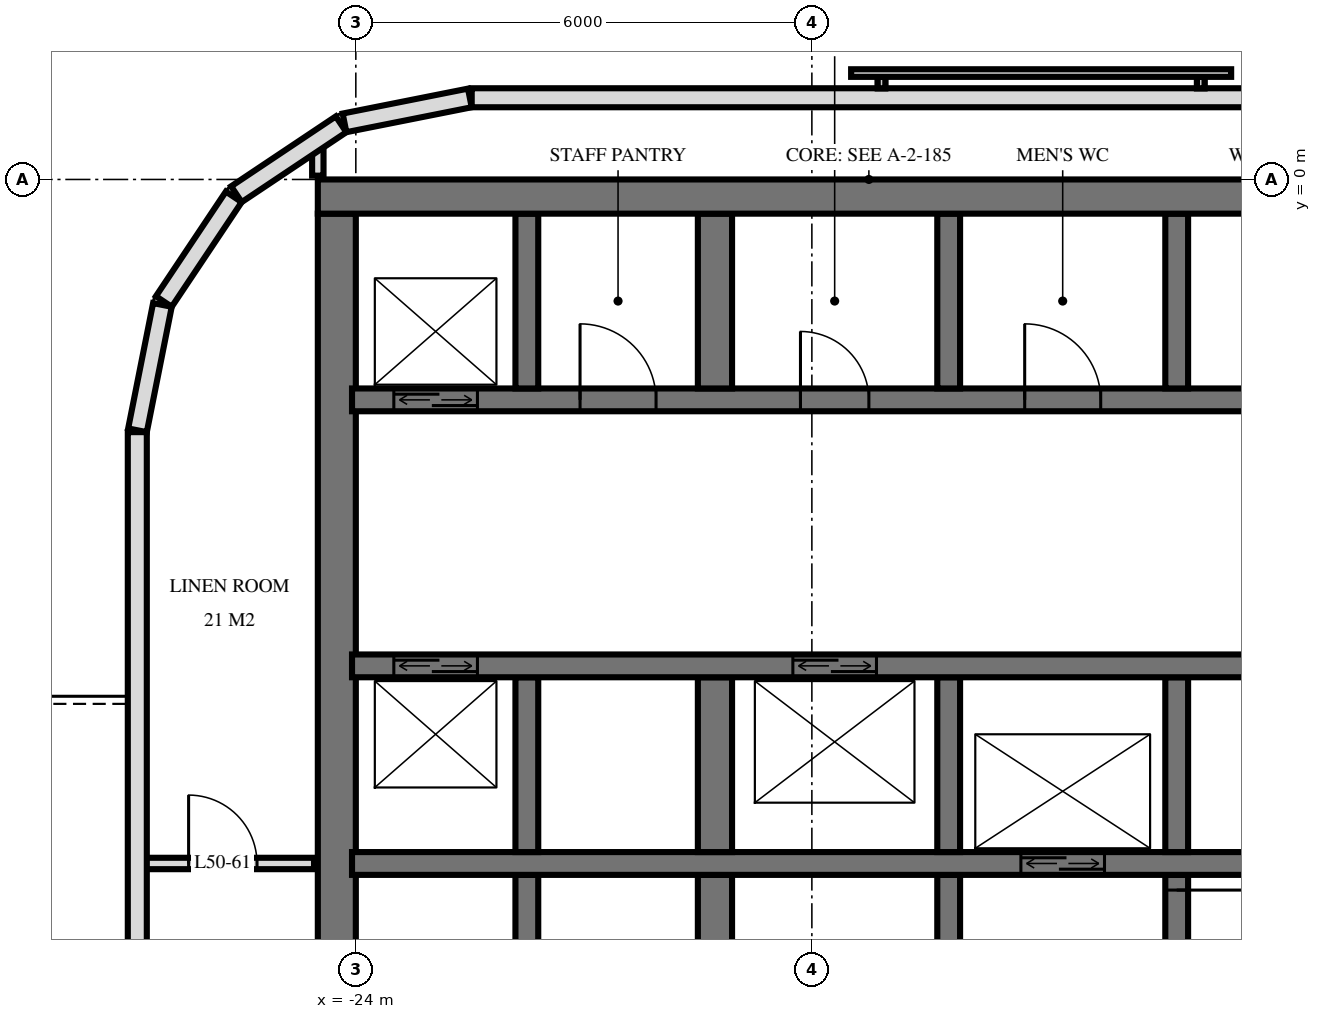
"""IFC4 building model, lengths in metres.
Left out: names, types, materials, properties, quantities, classifications, styles, units other than length and angle.
Written with IfcOpenShell. Run it as: python <this file> out.ifc"""

import sys

from ifc_helpers import new_model, si_unit, direction, frame, frame_2d, origin, place, context, subcontext, project, spatial, rectangle, extrude, element, fill, save


model = new_model("IFC4")
c1 = context("Model", 3, precision=1e-05, world=origin(), true_north=direction((0.0, 1.0)))
c2 = subcontext(c1, "Body", "Model", "MODEL_VIEW")
j1 = project(units=[si_unit("LENGTHUNIT", "METRE"), si_unit("PLANEANGLEUNIT", "RADIAN")], contexts=[c1])
p1 = place(None, origin())
s1 = spatial("IfcSite", under=j1, at=p1, CompositionType="ELEMENT")
p2 = place(p1, origin())
s2 = spatial("IfcBuilding", under=s1, at=p2, CompositionType="ELEMENT")
p3 = place(p2, frame((0.0, 0.0, 194.1)))
s3 = spatial("IfcBuildingStorey", under=s2, at=p3, CompositionType="ELEMENT", Elevation=194.1)
p4 = place(p3, frame((-24.5, -0.225, 0.0), z_axis=(0.0, 0.0, 1.0), x_axis=(1.0, 0.0, 0.0)))
e1 = element("IfcWall", 1, at=p4, inside=s3, PredefinedType="SHEAR", context=c2, shape_type="SweptSolid", body=[
    extrude(rectangle(XDim=14.5, YDim=0.45, at=frame_2d((7.25, 0.0))), origin(), (0.0, 0.0, 1.0), 3.5),
])
p5 = place(p3, frame((-24.25, -14.55, 0.0), z_axis=(0.0, 0.0, 1.0), x_axis=(0.0, 1.0, 0.0)))
e2 = element("IfcWall", 2, at=p5, inside=s3, PredefinedType="SHEAR", context=c2, shape_type="SweptSolid", body=[
    extrude(rectangle(XDim=14.1, YDim=0.5, at=frame_2d((7.05, 0.0))), origin(), (0.0, 0.0, 1.0), 3.5),
])
p6 = place(p3, frame((-24.05, -2.9, 0.0), z_axis=(0.0, 0.0, 1.0), x_axis=(1.0, 0.0, 0.0)))
e3 = element("IfcWall", 3, at=p6, inside=s3, PredefinedType="SHEAR", context=c2, shape_type="SweptSolid", body=[
    extrude(rectangle(XDim=13.7, YDim=0.3, at=frame_2d((6.85, 0.0))), origin(), (0.0, 0.0, 1.0), 3.5),
])
p7 = place(p6, frame((0.55, 0.0, 0.0)))
e4 = element("IfcOpeningElement", 4, at=p7, cuts=e3, PredefinedType="OPENING", context=c2, shape_type="SweptSolid", body=[
    extrude(rectangle(XDim=1.1, YDim=2.1, at=frame_2d((0.55, 1.05))), frame((0.0, 0.16, 0.0), z_axis=(0.0, -1.0, 0.0), x_axis=(1.0, 0.0, 0.0)), (0.0, 0.0, 1.0), 0.32),
])
p8 = place(p6, frame((5.9, 0.0, 0.0)))
e5 = element("IfcOpeningElement", 5, at=p8, cuts=e3, PredefinedType="OPENING", context=c2, shape_type="SweptSolid", body=[
    extrude(rectangle(XDim=0.9, YDim=2.1, at=frame_2d((0.45, 1.05))), frame((0.0, 0.16, 0.0), z_axis=(0.0, -1.0, 0.0), x_axis=(1.0, 0.0, 0.0)), (0.0, 0.0, 1.0), 0.32),
])
p9 = place(p6, frame((11.85, 0.0, 0.0)))
e6 = element("IfcOpeningElement", 6, at=p9, cuts=e3, PredefinedType="OPENING", context=c2, shape_type="SweptSolid", body=[
    extrude(rectangle(XDim=1.0, YDim=2.1, at=frame_2d((0.5, 1.05))), frame((0.0, 0.16, 0.0), z_axis=(0.0, -1.0, 0.0), x_axis=(1.0, 0.0, 0.0)), (0.0, 0.0, 1.0), 0.32),
])
p10 = place(p6, frame((8.85, 0.0, 0.0)))
e7 = element("IfcOpeningElement", 7, at=p10, cuts=e3, PredefinedType="OPENING", context=c2, shape_type="SweptSolid", body=[
    extrude(rectangle(XDim=1.0, YDim=2.1, at=frame_2d((0.5, 1.05))), frame((0.0, 0.16, 0.0), z_axis=(0.0, -1.0, 0.0), x_axis=(1.0, 0.0, 0.0)), (0.0, 0.0, 1.0), 0.32),
])
p11 = place(p6, frame((3.0, 0.0, 0.0)))
e8 = element("IfcOpeningElement", 8, at=p11, cuts=e3, PredefinedType="OPENING", context=c2, shape_type="SweptSolid", body=[
    extrude(rectangle(XDim=1.0, YDim=2.1, at=frame_2d((0.5, 1.05))), frame((0.0, 0.16, 0.0), z_axis=(0.0, -1.0, 0.0), x_axis=(1.0, 0.0, 0.0)), (0.0, 0.0, 1.0), 0.32),
])
p12 = place(p3, frame((-24.05, -6.4, 0.0), z_axis=(0.0, 0.0, 1.0), x_axis=(1.0, 0.0, 0.0)))
e9 = element("IfcWall", 9, at=p12, inside=s3, PredefinedType="SHEAR", context=c2, shape_type="SweptSolid", body=[
    extrude(rectangle(XDim=13.7, YDim=0.3, at=frame_2d((6.85, 0.0))), origin(), (0.0, 0.0, 1.0), 3.5),
])
p13 = place(p12, frame((0.55, 0.0, 0.0)))
e10 = element("IfcOpeningElement", 10, at=p13, cuts=e9, PredefinedType="OPENING", context=c2, shape_type="SweptSolid", body=[
    extrude(rectangle(XDim=1.1, YDim=2.1, at=frame_2d((0.55, 1.05))), frame((0.0, 0.16, 0.0), z_axis=(0.0, -1.0, 0.0), x_axis=(1.0, 0.0, 0.0)), (0.0, 0.0, 1.0), 0.32),
])
p14 = place(p12, frame((5.8, 0.0, 0.0)))
e11 = element("IfcOpeningElement", 11, at=p14, cuts=e9, PredefinedType="OPENING", context=c2, shape_type="SweptSolid", body=[
    extrude(rectangle(XDim=1.1, YDim=2.1, at=frame_2d((0.55, 1.05))), frame((0.0, 0.16, 0.0), z_axis=(0.0, -1.0, 0.0), x_axis=(1.0, 0.0, 0.0)), (0.0, 0.0, 1.0), 0.32),
])
p15 = place(p3, frame((-24.05, -9.0, 0.0), z_axis=(0.0, 0.0, 1.0), x_axis=(1.0, 0.0, 0.0)))
e12 = element("IfcWall", 12, at=p15, inside=s3, PredefinedType="SHEAR", context=c2, shape_type="SweptSolid", body=[
    extrude(rectangle(XDim=13.7, YDim=0.3, at=frame_2d((6.85, 0.0))), origin(), (0.0, 0.0, 1.0), 3.5),
])
p16 = place(p15, frame((8.8, 0.0, 0.0)))
e13 = element("IfcOpeningElement", 13, at=p16, cuts=e12, PredefinedType="OPENING", context=c2, shape_type="SweptSolid", body=[
    extrude(rectangle(XDim=1.1, YDim=2.1, at=frame_2d((0.55, 1.05))), frame((0.0, 0.16, 0.0), z_axis=(0.0, -1.0, 0.0), x_axis=(1.0, 0.0, 0.0)), (0.0, 0.0, 1.0), 0.32),
])
for number, where, z_axis, x_axis in (
    (14, (-13.2, -2.75, 0.0), (0.0, 0.0, 1.0), (0.0, 1.0, 0.0)),
    (15, (-13.2, -8.85, 0.0), (0.0, 0.0, 1.0), (0.0, 1.0, 0.0)),
):
    element("IfcWall", number, at=place(p3, frame(where, z_axis=z_axis, x_axis=x_axis)), inside=s3, PredefinedType="SHEAR", context=c2, shape_type="SweptSolid", body=[
        extrude(rectangle(XDim=2.3, YDim=0.3, at=frame_2d((1.15, 0.0))), origin(), (0.0, 0.0, 1.0), 3.5),
    ])
p17 = place(p3, frame((-13.2, -14.55, 0.0), z_axis=(0.0, 0.0, 1.0), x_axis=(0.0, 1.0, 0.0)))
e16 = element("IfcWall", 16, at=p17, inside=s3, PredefinedType="SHEAR", context=c2, shape_type="SweptSolid", body=[
    extrude(rectangle(XDim=5.4, YDim=0.3, at=frame_2d((2.7, 0.0))), origin(), (0.0, 0.0, 1.0), 3.5),
])
p18 = place(p17, frame((4.0, 0.0, 0.0)))
e17 = element("IfcOpeningElement", 17, at=p18, cuts=e16, PredefinedType="OPENING", context=c2, shape_type="SweptSolid", body=[
    extrude(rectangle(XDim=1.2, YDim=2.1, at=frame_2d((0.6, 1.05))), frame((0.0, 0.16, 0.0), z_axis=(0.0, -1.0, 0.0), x_axis=(1.0, 0.0, 0.0)), (0.0, 0.0, 1.0), 0.32),
])
for number, where, z_axis, x_axis in (
    (18, (-16.2, -2.75, 0.0), (0.0, 0.0, 1.0), (0.0, 1.0, 0.0)),
    (19, (-16.2, -8.85, 0.0), (0.0, 0.0, 1.0), (0.0, 1.0, 0.0)),
):
    element("IfcWall", number, at=place(p3, frame(where, z_axis=z_axis, x_axis=x_axis)), inside=s3, PredefinedType="SHEAR", context=c2, shape_type="SweptSolid", body=[
        extrude(rectangle(XDim=2.3, YDim=0.3, at=frame_2d((1.15, 0.0))), origin(), (0.0, 0.0, 1.0), 3.5),
    ])
p19 = place(p3, frame((-16.2, -14.55, 0.0), z_axis=(0.0, 0.0, 1.0), x_axis=(0.0, 1.0, 0.0)))
e20 = element("IfcWall", 20, at=p19, inside=s3, PredefinedType="SHEAR", context=c2, shape_type="SweptSolid", body=[
    extrude(rectangle(XDim=5.4, YDim=0.3, at=frame_2d((2.7, 0.0))), origin(), (0.0, 0.0, 1.0), 3.5),
])
p20 = place(p19, frame((0.2, 0.0, 0.0)))
e21 = element("IfcOpeningElement", 21, at=p20, cuts=e20, PredefinedType="OPENING", context=c2, shape_type="SweptSolid", body=[
    extrude(rectangle(XDim=1.2, YDim=2.1, at=frame_2d((0.6, 1.05))), frame((0.0, 0.16, 0.0), z_axis=(0.0, -1.0, 0.0), x_axis=(1.0, 0.0, 0.0)), (0.0, 0.0, 1.0), 0.32),
])
for number, where, z_axis, x_axis in (
    (22, (-19.275, -2.75, 0.0), (0.0, 0.0, 1.0), (0.0, 1.0, 0.0)),
    (23, (-19.275, -8.85, 0.0), (0.0, 0.0, 1.0), (0.0, 1.0, 0.0)),
):
    element("IfcWall", number, at=place(p3, frame(where, z_axis=z_axis, x_axis=x_axis)), inside=s3, PredefinedType="SHEAR", context=c2, shape_type="SweptSolid", body=[
        extrude(rectangle(XDim=2.3, YDim=0.45, at=frame_2d((1.15, 0.0))), origin(), (0.0, 0.0, 1.0), 3.5),
    ])
p21 = place(p3, frame((-19.275, -14.55, 0.0), z_axis=(0.0, 0.0, 1.0), x_axis=(0.0, 1.0, 0.0)))
e24 = element("IfcWall", 24, at=p21, inside=s3, PredefinedType="SHEAR", context=c2, shape_type="SweptSolid", body=[
    extrude(rectangle(XDim=5.4, YDim=0.45, at=frame_2d((2.7, 0.0))), origin(), (0.0, 0.0, 1.0), 3.5),
])
for number, where, z_axis, x_axis in (
    (25, (-21.75, -2.75, 0.0), (0.0, 0.0, 1.0), (0.0, 1.0, 0.0)),
    (26, (-21.75, -8.85, 0.0), (0.0, 0.0, 1.0), (0.0, 1.0, 0.0)),
):
    element("IfcWall", number, at=place(p3, frame(where, z_axis=z_axis, x_axis=x_axis)), inside=s3, PredefinedType="SHEAR", context=c2, shape_type="SweptSolid", body=[
        extrude(rectangle(XDim=2.3, YDim=0.3, at=frame_2d((1.15, 0.0))), origin(), (0.0, 0.0, 1.0), 3.5),
    ])
p22 = place(p3, frame((-21.75, -14.55, 0.0), z_axis=(0.0, 0.0, 1.0), x_axis=(0.0, 1.0, 0.0)))
e27 = element("IfcWall", 27, at=p22, inside=s3, PredefinedType="SHEAR", context=c2, shape_type="SweptSolid", body=[
    extrude(rectangle(XDim=5.4, YDim=0.3, at=frame_2d((2.7, 0.0))), origin(), (0.0, 0.0, 1.0), 3.5),
])
p23 = place(p3, frame((22.475, 1.075, 0.0), z_axis=(0.0, 0.0, 1.0), x_axis=(-1.0, 0.0, 0.0)))
e28 = element("IfcWall", 28, at=p23, inside=s3, PredefinedType="SOLIDWALL", context=c2, shape_type="SweptSolid", body=[
    extrude(rectangle(XDim=44.951, YDim=0.25, at=frame_2d((22.475, 0.0))), origin(), (0.0, 0.0, 1.0), 3.22),
])
p24 = place(p23, frame((13.775, 0.0, 0.9)))
e29 = element("IfcOpeningElement", 29, at=p24, cuts=e28, PredefinedType="OPENING", context=c2, shape_type="SweptSolid", body=[
    extrude(rectangle(XDim=2.4, YDim=1.5, at=frame_2d((1.2, 0.75))), frame((0.0, 0.135, 0.0), z_axis=(0.0, -1.0, 0.0), x_axis=(1.0, 0.0, 0.0)), (0.0, 0.0, 1.0), 0.27),
])
p25 = place(p23, frame((18.275, 0.0, 0.9)))
e30 = element("IfcOpeningElement", 30, at=p25, cuts=e28, PredefinedType="OPENING", context=c2, shape_type="SweptSolid", body=[
    extrude(rectangle(XDim=2.4, YDim=1.5, at=frame_2d((1.2, 0.75))), frame((0.0, 0.135, 0.0), z_axis=(0.0, -1.0, 0.0), x_axis=(1.0, 0.0, 0.0)), (0.0, 0.0, 1.0), 0.27),
])
p26 = place(p23, frame((29.025, 0.0, 0.9)))
e31 = element("IfcOpeningElement", 31, at=p26, cuts=e28, PredefinedType="OPENING", context=c2, shape_type="SweptSolid", body=[
    extrude(rectangle(XDim=2.4, YDim=1.5, at=frame_2d((1.2, 0.75))), frame((0.0, 0.135, 0.0), z_axis=(0.0, -1.0, 0.0), x_axis=(1.0, 0.0, 0.0)), (0.0, 0.0, 1.0), 0.27),
])
p27 = place(p3, frame((-22.5, 1.073, 0.0), z_axis=(0.0, 0.0, 1.0), x_axis=(-0.980803419081, -0.194999110559, 0.0)))
e32 = element("IfcWall", 32, at=p27, inside=s3, PredefinedType="SOLIDWALL", context=c2, shape_type="SweptSolid", body=[
    extrude(rectangle(XDim=1.681, YDim=0.25, at=frame_2d((0.841, 0.0))), origin(), (0.0, 0.0, 1.0), 3.22),
])
for number, where, z_axis, x_axis in (
    (33, (-24.194, 0.726, 0.0), (0.0, 0.0, 1.0), (-0.831, -0.556, 0.0)),
    (34, (-25.606, -0.229, 0.0), (0.0, 0.0, 1.0), (-0.556, -0.831, 0.0)),
):
    element("IfcWall", number, at=place(p3, frame(where, z_axis=z_axis, x_axis=x_axis)), inside=s3, PredefinedType="SOLIDWALL", context=c2, shape_type="SweptSolid", body=[
        extrude(rectangle(XDim=1.656, YDim=0.25, at=frame_2d((0.828, 0.0))), origin(), (0.0, 0.0, 1.0), 3.22),
    ])
p28 = place(p3, frame((-26.545, -1.651, 0.0), z_axis=(0.0, 0.0, 1.0), x_axis=(-0.194999110559, -0.980803419081, 0.0)))
e35 = element("IfcWall", 35, at=p28, inside=s3, PredefinedType="SOLIDWALL", context=c2, shape_type="SweptSolid", body=[
    extrude(rectangle(XDim=1.681, YDim=0.25, at=frame_2d((0.841, 0.0))), origin(), (0.0, 0.0, 1.0), 3.22),
])
p29 = place(p3, frame((-26.875, -3.325, 0.0), z_axis=(0.0, 0.0, 1.0), x_axis=(0.0, -1.0, 0.0)))
e36 = element("IfcWall", 36, at=p29, inside=s3, PredefinedType="SOLIDWALL", context=c2, shape_type="SweptSolid", body=[
    extrude(rectangle(XDim=21.551, YDim=0.25, at=frame_2d((10.775, 0.0))), origin(), (0.0, 0.0, 1.0), 3.22),
])
p30 = place(p29, frame((7.775, 0.0, 0.0)))
e37 = element("IfcOpeningElement", 37, at=p30, cuts=e36, PredefinedType="OPENING", context=c2, shape_type="SweptSolid", body=[
    extrude(rectangle(XDim=1.8, YDim=2.4, at=frame_2d((0.9, 1.2))), frame((0.0, 0.135, 0.0), z_axis=(0.0, -1.0, 0.0), x_axis=(1.0, 0.0, 0.0)), (0.0, 0.0, 1.0), 0.27),
])
p31 = place(p29, frame((12.575, 0.0, 0.9)))
e38 = element("IfcOpeningElement", 38, at=p31, cuts=e36, PredefinedType="OPENING", context=c2, shape_type="SweptSolid", body=[
    extrude(rectangle(XDim=1.2, YDim=1.5, at=frame_2d((0.6, 0.75))), frame((0.0, 0.135, 0.0), z_axis=(0.0, -1.0, 0.0), x_axis=(1.0, 0.0, 0.0)), (0.0, 0.0, 1.0), 0.27),
])
p32 = place(p29, frame((15.275, 0.0, 0.0)))
e39 = element("IfcOpeningElement", 39, at=p32, cuts=e36, PredefinedType="OPENING", context=c2, shape_type="SweptSolid", body=[
    extrude(rectangle(XDim=1.8, YDim=2.4, at=frame_2d((0.9, 1.2))), frame((0.0, 0.135, 0.0), z_axis=(0.0, -1.0, 0.0), x_axis=(1.0, 0.0, 0.0)), (0.0, 0.0, 1.0), 0.27),
])
p33 = place(p29, frame((19.325, 0.0, 0.0)))
e40 = element("IfcOpeningElement", 40, at=p33, cuts=e36, PredefinedType="OPENING", context=c2, shape_type="SweptSolid", body=[
    extrude(rectangle(XDim=1.8, YDim=2.4, at=frame_2d((0.9, 1.2))), frame((0.0, 0.135, 0.0), z_axis=(0.0, -1.0, 0.0), x_axis=(1.0, 0.0, 0.0)), (0.0, 0.0, 1.0), 0.27),
])
p34 = place(p3, frame((-24.5, 0.05, 0.0), z_axis=(0.0, 0.0, 1.0), x_axis=(0.0, 1.0, 0.0)))
e41 = element("IfcWall", 41, at=p34, inside=s3, PredefinedType="PARTITIONING", context=c2, shape_type="SweptSolid", body=[
    extrude(rectangle(XDim=0.405, YDim=0.15, at=frame_2d((0.203, 0.0))), origin(), (0.0, 0.0, 1.0), 3.22),
])
p35 = place(p3, frame((-26.82, -9.0, 0.0), z_axis=(0.0, 0.0, 1.0), x_axis=(1.0, 0.0, 0.0)))
e42 = element("IfcWall", 42, at=p35, inside=s3, PredefinedType="PARTITIONING", context=c2, shape_type="SweptSolid", body=[
    extrude(rectangle(XDim=2.27, YDim=0.15, at=frame_2d((1.135, 0.0))), origin(), (0.0, 0.0, 1.0), 3.22),
])
p36 = place(p35, frame((0.62, 0.0, 0.0)))
e43 = element("IfcOpeningElement", 43, at=p36, cuts=e42, PredefinedType="OPENING", context=c2, shape_type="SweptSolid", body=[
    extrude(rectangle(XDim=0.9, YDim=2.1, at=frame_2d((0.45, 1.05))), frame((0.0, 0.085, 0.0), z_axis=(0.0, -1.0, 0.0), x_axis=(1.0, 0.0, 0.0)), (0.0, 0.0, 1.0), 0.17),
])
p37 = place(p7, origin())
e44 = element("IfcDoor", 44, at=p37, inside=s3, OperationType="DOUBLE_DOOR_SLIDING", PredefinedType="USERDEFINED", context=c2, shape_type="SweptSolid", body=[
    extrude(rectangle(XDim=1.1, YDim=2.1, at=frame_2d((0.55, 1.05))), frame((0.0, 0.025, 0.0), z_axis=(0.0, -1.0, 0.0), x_axis=(1.0, 0.0, 0.0)), (0.0, 0.0, 1.0), 0.05),
])
fill(e4, e44)
p38 = place(p13, origin())
e45 = element("IfcDoor", 45, at=p38, inside=s3, OperationType="DOUBLE_DOOR_SLIDING", PredefinedType="USERDEFINED", context=c2, shape_type="SweptSolid", body=[
    extrude(rectangle(XDim=1.1, YDim=2.1, at=frame_2d((0.55, 1.05))), frame((0.0, 0.025, 0.0), z_axis=(0.0, -1.0, 0.0), x_axis=(1.0, 0.0, 0.0)), (0.0, 0.0, 1.0), 0.05),
])
fill(e10, e45)
p39 = place(p16, origin())
e46 = element("IfcDoor", 46, at=p39, inside=s3, OperationType="DOUBLE_DOOR_SLIDING", PredefinedType="USERDEFINED", context=c2, shape_type="SweptSolid", body=[
    extrude(rectangle(XDim=1.1, YDim=2.1, at=frame_2d((0.55, 1.05))), frame((0.0, 0.025, 0.0), z_axis=(0.0, -1.0, 0.0), x_axis=(1.0, 0.0, 0.0)), (0.0, 0.0, 1.0), 0.05),
])
fill(e13, e46)
p40 = place(p14, origin())
e47 = element("IfcDoor", 47, at=p40, inside=s3, OperationType="DOUBLE_DOOR_SLIDING", PredefinedType="USERDEFINED", context=c2, shape_type="SweptSolid", body=[
    extrude(rectangle(XDim=1.1, YDim=2.1, at=frame_2d((0.55, 1.05))), frame((0.0, 0.025, 0.0), z_axis=(0.0, -1.0, 0.0), x_axis=(1.0, 0.0, 0.0)), (0.0, 0.0, 1.0), 0.05),
])
fill(e11, e47)
p41 = place(p8, origin())
e48 = element("IfcDoor", 48, at=p41, inside=s3, OperationType="SINGLE_SWING_RIGHT", PredefinedType="DOOR", context=c2, shape_type="SweptSolid", body=[
    extrude(rectangle(XDim=0.9, YDim=2.1, at=frame_2d((0.45, 1.05))), frame((0.0, 0.025, 0.0), z_axis=(0.0, -1.0, 0.0), x_axis=(1.0, 0.0, 0.0)), (0.0, 0.0, 1.0), 0.05),
])
fill(e5, e48)
p42 = place(p10, origin())
e49 = element("IfcDoor", 49, at=p42, inside=s3, OperationType="SINGLE_SWING_RIGHT", PredefinedType="DOOR", context=c2, shape_type="SweptSolid", body=[
    extrude(rectangle(XDim=1.0, YDim=2.1, at=frame_2d((0.5, 1.05))), frame((0.0, 0.025, 0.0), z_axis=(0.0, -1.0, 0.0), x_axis=(1.0, 0.0, 0.0)), (0.0, 0.0, 1.0), 0.05),
])
fill(e7, e49)
p43 = place(p11, origin())
e50 = element("IfcDoor", 50, at=p43, inside=s3, OperationType="SINGLE_SWING_RIGHT", PredefinedType="DOOR", context=c2, shape_type="SweptSolid", body=[
    extrude(rectangle(XDim=1.0, YDim=2.1, at=frame_2d((0.5, 1.05))), frame((0.0, 0.025, 0.0), z_axis=(0.0, -1.0, 0.0), x_axis=(1.0, 0.0, 0.0)), (0.0, 0.0, 1.0), 0.05),
])
fill(e8, e50)
p44 = place(p18, frame((0.6, 0.0, 0.0), z_axis=(0.0, 0.0, 1.0), x_axis=(-1.0, 0.0, 0.0)))
e51 = element("IfcDoor", 51, at=p44, inside=s3, OperationType="SINGLE_SWING_RIGHT", PredefinedType="DOOR", context=c2, shape_type="SweptSolid", body=[
    extrude(rectangle(XDim=1.2, YDim=2.1, at=frame_2d((0.0, 1.05))), frame((0.0, -0.025, 0.0), z_axis=(0.0, 1.0, 0.0), x_axis=(-1.0, 0.0, 0.0)), (0.0, 0.0, 1.0), 0.05),
])
fill(e17, e51)
p45 = place(p36, origin())
e52 = element("IfcDoor", 52, at=p45, inside=s3, OperationType="SINGLE_SWING_RIGHT", PredefinedType="DOOR", context=c2, shape_type="SweptSolid", body=[
    extrude(rectangle(XDim=0.9, YDim=2.1, at=frame_2d((0.45, 1.05))), frame((0.0, 0.025, 0.0), z_axis=(0.0, -1.0, 0.0), x_axis=(1.0, 0.0, 0.0)), (0.0, 0.0, 1.0), 0.05),
])
fill(e43, e52)
save(model, sys.argv[1])
